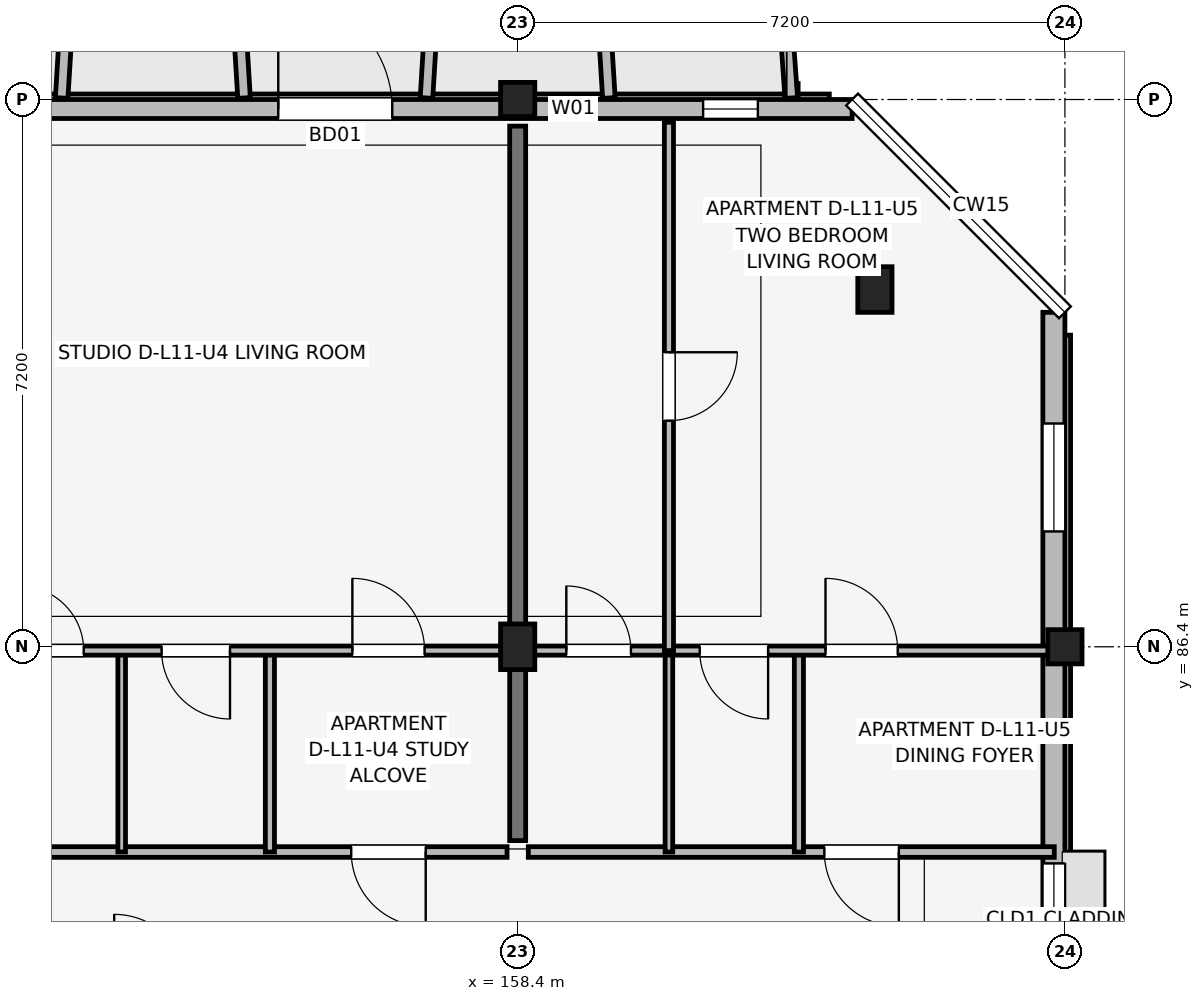
"""IFC4 building model, lengths in metres.
Left out: names, types, materials, properties, quantities, classifications, styles, units other than length and angle.
Written with IfcOpenShell. Run it as: python <this file> out.ifc"""

import sys

from ifc_helpers import new_model, si_unit, direction, frame, frame_2d, origin, origin_2d, place, context, subcontext, project, spatial, rectangle, extrude, element, fill, save


model = new_model("IFC4")
c1 = context("Model", 3, precision=1e-05, world=origin(), true_north=direction((0.0, 1.0)))
c2 = subcontext(c1, "Body", "Model", "MODEL_VIEW")
j1 = project(units=[si_unit("LENGTHUNIT", "METRE"), si_unit("PLANEANGLEUNIT", "RADIAN")], contexts=[c1])
p1 = place(None, origin())
s1 = spatial("IfcSite", under=j1, at=p1, CompositionType="ELEMENT")
p2 = place(p1, origin())
s2 = spatial("IfcBuilding", under=s1, at=p2, CompositionType="ELEMENT")
p3 = place(p2, frame((0.0, 0.0, 37.05)))
s3 = spatial("IfcBuildingStorey", under=s2, at=p3, CompositionType="ELEMENT", Elevation=37.05)
p4 = place(p3, frame((158.4, 86.4, 0.0), z_axis=(0.0, 0.0, 1.0), x_axis=(1.0, 0.0, 0.0)))
e1 = element("IfcColumn", 1, at=p4, inside=s3, PredefinedType="COLUMN", context=c2, shape_type="SweptSolid", body=[
    extrude(rectangle(XDim=0.45, YDim=0.6, at=origin_2d()), origin(), (0.0, 0.0, 1.0), 3.15),
])
for number, where, z_axis, x_axis in (
    (2, (158.4, 93.6, 0.0), (0.0, 0.0, 1.0), (1.0, 0.0, 0.0)),
    (3, (165.6, 86.4, 0.0), (0.0, 0.0, 1.0), (1.0, 0.0, 0.0)),
):
    element("IfcColumn", number, at=place(p3, frame(where, z_axis=z_axis, x_axis=x_axis)), inside=s3, PredefinedType="COLUMN", context=c2, shape_type="SweptSolid", body=[
        extrude(rectangle(XDim=0.45, YDim=0.45, at=origin_2d()), origin(), (0.0, 0.0, 1.0), 3.15),
    ])
p5 = place(p3, frame((163.1, 91.1, 0.0), z_axis=(0.0, 0.0, 1.0), x_axis=(1.0, 0.0, 0.0)))
e4 = element("IfcColumn", 4, at=p5, inside=s3, PredefinedType="COLUMN", context=c2, shape_type="SweptSolid", body=[
    extrude(rectangle(XDim=0.45, YDim=0.6, at=origin_2d()), origin(), (0.0, 0.0, 1.0), 3.15),
])
p6 = place(p3, frame((158.4, 83.85, 0.0), z_axis=(0.0, 0.0, 1.0), x_axis=(0.0, 1.0, 0.0)))
e5 = element("IfcWall", 5, at=p6, inside=s3, PredefinedType="SHEAR", context=c2, shape_type="SweptSolid", body=[
    extrude(rectangle(XDim=9.4, YDim=0.21, at=frame_2d((4.7, 0.0))), origin(), (0.0, 0.0, 1.0), 3.15),
])
p7 = place(p3, frame((165.455, 74.8, 0.0), z_axis=(0.0, 0.0, 1.0), x_axis=(0.0, 1.0, 0.0)))
e6 = element("IfcWall", 6, at=p7, inside=s3, PredefinedType="SOLIDWALL", context=c2, shape_type="SweptSolid", body=[
    extrude(rectangle(XDim=16.0, YDim=0.29, at=frame_2d((8.0, 0.0))), origin(), (0.0, 0.0, 1.0), 2.48),
])
p8 = place(p7, frame((7.25, 0.0, 1.05)))
e7 = element("IfcOpeningElement", 7, at=p8, cuts=e6, PredefinedType="OPENING", context=c2, shape_type="SweptSolid", body=[
    extrude(rectangle(XDim=1.5, YDim=1.15, at=frame_2d((0.75, 0.575))), frame((0.0, 0.155, 0.0), z_axis=(0.0, -1.0, 0.0), x_axis=(1.0, 0.0, 0.0)), (0.0, 0.0, 1.0), 0.31),
])
p9 = place(p7, frame((13.117, 0.0, 0.75)))
e8 = element("IfcOpeningElement", 8, at=p9, cuts=e6, PredefinedType="OPENING", context=c2, shape_type="SweptSolid", body=[
    extrude(rectangle(XDim=1.42, YDim=1.6, at=frame_2d((0.71, 0.8))), frame((0.0, 0.155, 0.0), z_axis=(0.0, -1.0, 0.0), x_axis=(1.0, 0.0, 0.0)), (0.0, 0.0, 1.0), 0.31),
])
p10 = place(p3, frame((162.8, 93.475, 0.0), z_axis=(0.0, 0.0, 1.0), x_axis=(-1.0, 0.0, 0.0)))
e9 = element("IfcWall", 9, at=p10, inside=s3, PredefinedType="SOLIDWALL", context=c2, shape_type="SweptSolid", body=[
    extrude(rectangle(XDim=30.4, YDim=0.25, at=frame_2d((15.2, 0.0))), origin(), (0.0, 0.0, 1.0), 2.45),
])
p11 = place(p10, frame((22.025, 0.0, 0.0), z_axis=(0.0, 0.0, 1.0), x_axis=(-1.0, 0.0, 0.0)))
e10 = element("IfcOpeningElement", 10, at=p11, cuts=e9, PredefinedType="OPENING", context=c2, shape_type="SweptSolid", body=[
    extrude(rectangle(XDim=1.65, YDim=2.15, at=frame_2d((0.825, 1.075))), frame((0.0, 0.135, 0.0), z_axis=(0.0, -1.0, 0.0), x_axis=(1.0, 0.0, 0.0)), (0.0, 0.0, 1.0), 0.27),
])
p12 = place(p10, frame((7.55, 0.0, 0.0), z_axis=(0.0, 0.0, 1.0), x_axis=(-1.0, 0.0, 0.0)))
e11 = element("IfcOpeningElement", 11, at=p12, cuts=e9, PredefinedType="OPENING", context=c2, shape_type="SweptSolid", body=[
    extrude(rectangle(XDim=1.5, YDim=2.15, at=frame_2d((0.75, 1.075))), frame((0.0, 0.135, 0.0), z_axis=(0.0, -1.0, 0.0), x_axis=(1.0, 0.0, 0.0)), (0.0, 0.0, 1.0), 0.27),
])
p13 = place(p10, frame((27.325, 0.0, 0.69)))
e12 = element("IfcOpeningElement", 12, at=p13, cuts=e9, PredefinedType="OPENING", context=c2, shape_type="SweptSolid", body=[
    extrude(rectangle(XDim=2.15, YDim=1.65, at=frame_2d((1.075, 0.825))), frame((0.0, 0.135, 0.0), z_axis=(0.0, -1.0, 0.0), x_axis=(1.0, 0.0, 0.0)), (0.0, 0.0, 1.0), 0.27),
])
p14 = place(p10, frame((23.925, 0.0, 0.75)))
e13 = element("IfcOpeningElement", 13, at=p14, cuts=e9, PredefinedType="OPENING", context=c2, shape_type="SweptSolid", body=[
    extrude(rectangle(XDim=0.72, YDim=1.35, at=frame_2d((0.36, 0.675))), frame((0.0, 0.135, 0.0), z_axis=(0.0, -1.0, 0.0), x_axis=(1.0, 0.0, 0.0)), (0.0, 0.0, 1.0), 0.27),
])
p15 = place(p10, frame((15.54, 0.0, 0.7)))
e14 = element("IfcOpeningElement", 14, at=p15, cuts=e9, PredefinedType="OPENING", context=c2, shape_type="SweptSolid", body=[
    extrude(rectangle(XDim=1.72, YDim=1.6, at=frame_2d((0.86, 0.8))), frame((0.0, 0.135, 0.0), z_axis=(0.0, -1.0, 0.0), x_axis=(1.0, 0.0, 0.0)), (0.0, 0.0, 1.0), 0.27),
])
p16 = place(p10, frame((3.367, 0.0, 0.75)))
e15 = element("IfcOpeningElement", 15, at=p16, cuts=e9, PredefinedType="OPENING", context=c2, shape_type="SweptSolid", body=[
    extrude(rectangle(XDim=0.6, YDim=1.25, at=frame_2d((0.3, 0.625))), frame((0.0, 0.135, 0.0), z_axis=(0.0, -1.0, 0.0), x_axis=(1.0, 0.0, 0.0)), (0.0, 0.0, 1.0), 0.27),
])
p17 = place(p10, frame((1.24, 0.0, 0.75)))
e16 = element("IfcOpeningElement", 16, at=p17, cuts=e9, PredefinedType="OPENING", context=c2, shape_type="SweptSolid", body=[
    extrude(rectangle(XDim=0.72, YDim=1.35, at=frame_2d((0.36, 0.675))), frame((0.0, 0.135, 0.0), z_axis=(0.0, -1.0, 0.0), x_axis=(1.0, 0.0, 0.0)), (0.0, 0.0, 1.0), 0.27),
])
for number, where, z_axis, x_axis in (
    (17, (152.4, 93.62, 0.0), (0.0, 0.0, 1.0), (0.061, 0.998, 0.0)),
    (18, (154.8, 93.62, 0.0), (0.0, 0.0, 1.0), (-0.061, 0.998, 0.0)),
    (19, (157.2, 93.62, 0.0), (0.0, 0.0, 1.0), (0.061, 0.998, 0.0)),
):
    element("IfcWall", number, at=place(p3, frame(where, z_axis=z_axis, x_axis=x_axis)), inside=s3, PredefinedType="ELEMENTEDWALL", context=c2, shape_type="SweptSolid", body=[
        extrude(rectangle(XDim=1.964, YDim=0.165, at=frame_2d((0.982, 0.0))), origin(), (0.0, 0.0, 1.0), 2.53),
    ])
p18 = place(p3, frame((159.6, 93.62, 0.0), z_axis=(0.0, 0.0, 1.0), x_axis=(-0.061170732449, 0.998127317276, 0.0)))
e20 = element("IfcWall", 20, at=p18, inside=s3, PredefinedType="ELEMENTEDWALL", context=c2, shape_type="SweptSolid", body=[
    extrude(rectangle(XDim=1.964, YDim=0.165, at=frame_2d((0.982, 0.0))), origin(), (0.0, 0.0, 1.0), 2.95),
])
p19 = place(p3, frame((162.0, 93.62, 0.0), z_axis=(0.0, 0.0, 1.0), x_axis=(-0.071194071069, 0.997462482625, 0.0)))
e21 = element("IfcWall", 21, at=p19, inside=s3, PredefinedType="ELEMENTEDWALL", context=c2, shape_type="SweptSolid", body=[
    extrude(rectangle(XDim=1.965, YDim=0.165, at=frame_2d((0.982, 0.0))), origin(), (0.0, 0.0, 1.0), 2.95),
])
p20 = place(p3, frame((151.34, 83.7, 0.0), z_axis=(0.0, 0.0, 1.0), x_axis=(1.0, 0.0, 0.0)))
e22 = element("IfcWall", 22, at=p20, inside=s3, PredefinedType="PARTITIONING", context=c2, shape_type="SweptSolid", body=[
    extrude(rectangle(XDim=6.92, YDim=0.14, at=frame_2d((3.46, 0.0))), origin(), (0.0, 0.0, 1.0), 2.38),
])
p21 = place(p20, frame((5.85, 0.0, 0.0), z_axis=(0.0, 0.0, 1.0), x_axis=(-1.0, 0.0, 0.0)))
e23 = element("IfcOpeningElement", 23, at=p21, cuts=e22, PredefinedType="OPENING", context=c2, shape_type="SweptSolid", body=[
    extrude(rectangle(XDim=0.98, YDim=2.1, at=frame_2d((0.49, 1.05))), frame((0.0, 0.08, 0.0), z_axis=(0.0, -1.0, 0.0), x_axis=(1.0, 0.0, 0.0)), (0.0, 0.0, 1.0), 0.16),
])
p22 = place(p3, frame((153.19, 83.7, 0.0), z_axis=(0.0, 0.0, 1.0), x_axis=(0.0, 1.0, 0.0)))
e24 = element("IfcWall", 24, at=p22, inside=s3, PredefinedType="PARTITIONING", context=c2, shape_type="SweptSolid", body=[
    extrude(rectangle(XDim=2.65, YDim=0.1, at=frame_2d((1.325, 0.0))), origin(), (0.0, 0.0, 1.0), 2.38),
])
p23 = place(p3, frame((155.14, 83.7, 0.0), z_axis=(0.0, 0.0, 1.0), x_axis=(0.0, 1.0, 0.0)))
e25 = element("IfcWall", 25, at=p23, inside=s3, PredefinedType="PARTITIONING", context=c2, shape_type="SweptSolid", body=[
    extrude(rectangle(XDim=2.65, YDim=0.12, at=frame_2d((1.325, 0.0))), origin(), (0.0, 0.0, 1.0), 2.38),
])
p24 = place(p3, frame((151.34, 86.35, 0.0), z_axis=(0.0, 0.0, 1.0), x_axis=(1.0, 0.0, 0.0)))
e26 = element("IfcWall", 26, at=p24, inside=s3, PredefinedType="PARTITIONING", context=c2, shape_type="SweptSolid", body=[
    extrude(rectangle(XDim=6.92, YDim=0.12, at=frame_2d((3.46, 0.0))), origin(), (0.0, 0.0, 1.0), 2.38),
])
p25 = place(p24, frame((0.5, 0.0, 0.0)))
e27 = element("IfcOpeningElement", 27, at=p25, cuts=e26, PredefinedType="OPENING", context=c2, shape_type="SweptSolid", body=[
    extrude(rectangle(XDim=0.85, YDim=2.08, at=frame_2d((0.425, 1.04))), frame((0.0, 0.07, 0.0), z_axis=(0.0, -1.0, 0.0), x_axis=(1.0, 0.0, 0.0)), (0.0, 0.0, 1.0), 0.14),
])
p26 = place(p24, frame((3.275, 0.0, 0.0), z_axis=(0.0, 0.0, 1.0), x_axis=(-1.0, 0.0, 0.0)))
e28 = element("IfcOpeningElement", 28, at=p26, cuts=e26, PredefinedType="OPENING", context=c2, shape_type="SweptSolid", body=[
    extrude(rectangle(XDim=0.9, YDim=2.08, at=frame_2d((0.45, 1.04))), frame((0.0, 0.07, 0.0), z_axis=(0.0, -1.0, 0.0), x_axis=(1.0, 0.0, 0.0)), (0.0, 0.0, 1.0), 0.14),
])
p27 = place(p24, frame((4.885, 0.0, 0.0)))
e29 = element("IfcOpeningElement", 29, at=p27, cuts=e26, PredefinedType="OPENING", context=c2, shape_type="SweptSolid", body=[
    extrude(rectangle(XDim=0.95, YDim=2.08, at=frame_2d((0.475, 1.04))), frame((0.0, 0.07, 0.0), z_axis=(0.0, -1.0, 0.0), x_axis=(1.0, 0.0, 0.0)), (0.0, 0.0, 1.0), 0.14),
])
p28 = place(p3, frame((158.54, 83.7, 0.0), z_axis=(0.0, 0.0, 1.0), x_axis=(1.0, 0.0, 0.0)))
e30 = element("IfcWall", 30, at=p28, inside=s3, PredefinedType="PARTITIONING", context=c2, shape_type="SweptSolid", body=[
    extrude(rectangle(XDim=6.92, YDim=0.14, at=frame_2d((3.46, 0.0))), origin(), (0.0, 0.0, 1.0), 2.38),
])
p29 = place(p28, frame((4.875, 0.0, 0.0), z_axis=(0.0, 0.0, 1.0), x_axis=(-1.0, 0.0, 0.0)))
e31 = element("IfcOpeningElement", 31, at=p29, cuts=e30, PredefinedType="OPENING", context=c2, shape_type="SweptSolid", body=[
    extrude(rectangle(XDim=0.98, YDim=2.1, at=frame_2d((0.49, 1.05))), frame((0.0, 0.08, 0.0), z_axis=(0.0, -1.0, 0.0), x_axis=(1.0, 0.0, 0.0)), (0.0, 0.0, 1.0), 0.16),
])
p30 = place(p3, frame((160.39, 83.7, 0.0), z_axis=(0.0, 0.0, 1.0), x_axis=(0.0, 1.0, 0.0)))
e32 = element("IfcWall", 32, at=p30, inside=s3, PredefinedType="PARTITIONING", context=c2, shape_type="SweptSolid", body=[
    extrude(rectangle(XDim=2.65, YDim=0.1, at=frame_2d((1.325, 0.0))), origin(), (0.0, 0.0, 1.0), 2.38),
])
p31 = place(p3, frame((162.1, 83.7, 0.0), z_axis=(0.0, 0.0, 1.0), x_axis=(0.0, 1.0, 0.0)))
e33 = element("IfcWall", 33, at=p31, inside=s3, PredefinedType="PARTITIONING", context=c2, shape_type="SweptSolid", body=[
    extrude(rectangle(XDim=2.65, YDim=0.12, at=frame_2d((1.325, 0.0))), origin(), (0.0, 0.0, 1.0), 2.38),
])
p32 = place(p3, frame((158.54, 86.35, 0.0), z_axis=(0.0, 0.0, 1.0), x_axis=(1.0, 0.0, 0.0)))
e34 = element("IfcWall", 34, at=p32, inside=s3, PredefinedType="PARTITIONING", context=c2, shape_type="SweptSolid", body=[
    extrude(rectangle(XDim=6.92, YDim=0.12, at=frame_2d((3.46, 0.0))), origin(), (0.0, 0.0, 1.0), 2.38),
])
p33 = place(p32, frame((0.5, 0.0, 0.0)))
e35 = element("IfcOpeningElement", 35, at=p33, cuts=e34, PredefinedType="OPENING", context=c2, shape_type="SweptSolid", body=[
    extrude(rectangle(XDim=0.85, YDim=2.08, at=frame_2d((0.425, 1.04))), frame((0.0, 0.07, 0.0), z_axis=(0.0, -1.0, 0.0), x_axis=(1.0, 0.0, 0.0)), (0.0, 0.0, 1.0), 0.14),
])
p34 = place(p32, frame((3.155, 0.0, 0.0), z_axis=(0.0, 0.0, 1.0), x_axis=(-1.0, 0.0, 0.0)))
e36 = element("IfcOpeningElement", 36, at=p34, cuts=e34, PredefinedType="OPENING", context=c2, shape_type="SweptSolid", body=[
    extrude(rectangle(XDim=0.9, YDim=2.08, at=frame_2d((0.45, 1.04))), frame((0.0, 0.07, 0.0), z_axis=(0.0, -1.0, 0.0), x_axis=(1.0, 0.0, 0.0)), (0.0, 0.0, 1.0), 0.14),
])
p35 = place(p32, frame((3.91, 0.0, 0.0)))
e37 = element("IfcOpeningElement", 37, at=p35, cuts=e34, PredefinedType="OPENING", context=c2, shape_type="SweptSolid", body=[
    extrude(rectangle(XDim=0.95, YDim=2.08, at=frame_2d((0.475, 1.04))), frame((0.0, 0.07, 0.0), z_axis=(0.0, -1.0, 0.0), x_axis=(1.0, 0.0, 0.0)), (0.0, 0.0, 1.0), 0.14),
])
p36 = place(p3, frame((160.39, 86.35, 0.0), z_axis=(0.0, 0.0, 1.0), x_axis=(0.0, 1.0, 0.0)))
e38 = element("IfcWall", 38, at=p36, inside=s3, PredefinedType="PARTITIONING", context=c2, shape_type="SweptSolid", body=[
    extrude(rectangle(XDim=6.95, YDim=0.12, at=frame_2d((3.475, 0.0))), origin(), (0.0, 0.0, 1.0), 2.38),
])
p37 = place(p36, frame((3.925, 0.0, 0.0), z_axis=(0.0, 0.0, 1.0), x_axis=(-1.0, 0.0, 0.0)))
e39 = element("IfcOpeningElement", 39, at=p37, cuts=e38, PredefinedType="OPENING", context=c2, shape_type="SweptSolid", body=[
    extrude(rectangle(XDim=0.9, YDim=2.08, at=frame_2d((0.45, 1.04))), frame((0.0, 0.07, 0.0), z_axis=(0.0, -1.0, 0.0), x_axis=(1.0, 0.0, 0.0)), (0.0, 0.0, 1.0), 0.14),
])
p38 = place(p12, origin())
e40 = element("IfcDoor", 40, at=p38, inside=s3, OperationType="SINGLE_SWING_RIGHT", PredefinedType="DOOR", context=c2, shape_type="SweptSolid", body=[
    extrude(rectangle(XDim=1.5, YDim=2.15, at=frame_2d((0.75, 1.075))), frame((0.0, 0.025, 0.0), z_axis=(0.0, -1.0, 0.0), x_axis=(1.0, 0.0, 0.0)), (0.0, 0.0, 1.0), 0.05),
])
fill(e11, e40)
p39 = place(p16, origin())
e41 = element("IfcWindow", 41, at=p39, inside=s3, PartitioningType="SINGLE_PANEL", PredefinedType="WINDOW", context=c2, shape_type="SweptSolid", body=[
    extrude(rectangle(XDim=0.6, YDim=1.25, at=frame_2d((0.3, 0.625))), frame((0.0, 0.03, 0.0), z_axis=(0.0, -1.0, 0.0), x_axis=(1.0, 0.0, 0.0)), (0.0, 0.0, 1.0), 0.06),
])
fill(e15, e41)
p40 = place(p17, origin())
e42 = element("IfcWindow", 42, at=p40, inside=s3, PartitioningType="SINGLE_PANEL", PredefinedType="WINDOW", context=c2, shape_type="SweptSolid", body=[
    extrude(rectangle(XDim=0.72, YDim=1.35, at=frame_2d((0.36, 0.675))), frame((0.0, 0.03, 0.0), z_axis=(0.0, -1.0, 0.0), x_axis=(1.0, 0.0, 0.0)), (0.0, 0.0, 1.0), 0.06),
])
fill(e16, e42)
p41 = place(p8, origin())
e43 = element("IfcWindow", 43, at=p41, inside=s3, PartitioningType="SINGLE_PANEL", PredefinedType="WINDOW", context=c2, shape_type="SweptSolid", body=[
    extrude(rectangle(XDim=1.5, YDim=1.15, at=frame_2d((0.75, 0.575))), frame((0.0, 0.03, 0.0), z_axis=(0.0, -1.0, 0.0), x_axis=(1.0, 0.0, 0.0)), (0.0, 0.0, 1.0), 0.06),
])
fill(e7, e43)
p42 = place(p9, origin())
e44 = element("IfcWindow", 44, at=p42, inside=s3, PartitioningType="SINGLE_PANEL", PredefinedType="WINDOW", context=c2, shape_type="SweptSolid", body=[
    extrude(rectangle(XDim=1.42, YDim=1.6, at=frame_2d((0.71, 0.8))), frame((0.0, 0.03, 0.0), z_axis=(0.0, -1.0, 0.0), x_axis=(1.0, 0.0, 0.0)), (0.0, 0.0, 1.0), 0.06),
])
fill(e8, e44)
p43 = place(p21, origin())
e45 = element("IfcDoor", 45, at=p43, inside=s3, OperationType="SINGLE_SWING_RIGHT", PredefinedType="DOOR", context=c2, shape_type="SweptSolid", body=[
    extrude(rectangle(XDim=0.98, YDim=2.1, at=frame_2d((0.49, 1.05))), frame((0.0, 0.025, 0.0), z_axis=(0.0, -1.0, 0.0), x_axis=(1.0, 0.0, 0.0)), (0.0, 0.0, 1.0), 0.05),
])
fill(e23, e45)
p44 = place(p25, origin())
e46 = element("IfcDoor", 46, at=p44, inside=s3, OperationType="SINGLE_SWING_LEFT", PredefinedType="DOOR", context=c2, shape_type="SweptSolid", body=[
    extrude(rectangle(XDim=0.85, YDim=2.08, at=frame_2d((0.425, 1.04))), frame((0.0, 0.025, 0.0), z_axis=(0.0, -1.0, 0.0), x_axis=(1.0, 0.0, 0.0)), (0.0, 0.0, 1.0), 0.05),
])
fill(e27, e46)
p45 = place(p26, origin())
e47 = element("IfcDoor", 47, at=p45, inside=s3, OperationType="SINGLE_SWING_RIGHT", PredefinedType="DOOR", context=c2, shape_type="SweptSolid", body=[
    extrude(rectangle(XDim=0.9, YDim=2.08, at=frame_2d((0.45, 1.04))), frame((0.0, 0.025, 0.0), z_axis=(0.0, -1.0, 0.0), x_axis=(1.0, 0.0, 0.0)), (0.0, 0.0, 1.0), 0.05),
])
fill(e28, e47)
p46 = place(p27, origin())
e48 = element("IfcDoor", 48, at=p46, inside=s3, OperationType="SINGLE_SWING_LEFT", PredefinedType="DOOR", context=c2, shape_type="SweptSolid", body=[
    extrude(rectangle(XDim=0.95, YDim=2.08, at=frame_2d((0.475, 1.04))), frame((0.0, 0.025, 0.0), z_axis=(0.0, -1.0, 0.0), x_axis=(1.0, 0.0, 0.0)), (0.0, 0.0, 1.0), 0.05),
])
fill(e29, e48)
p47 = place(p29, origin())
e49 = element("IfcDoor", 49, at=p47, inside=s3, OperationType="SINGLE_SWING_RIGHT", PredefinedType="DOOR", context=c2, shape_type="SweptSolid", body=[
    extrude(rectangle(XDim=0.98, YDim=2.1, at=frame_2d((0.49, 1.05))), frame((0.0, 0.025, 0.0), z_axis=(0.0, -1.0, 0.0), x_axis=(1.0, 0.0, 0.0)), (0.0, 0.0, 1.0), 0.05),
])
fill(e31, e49)
p48 = place(p33, origin())
e50 = element("IfcDoor", 50, at=p48, inside=s3, OperationType="SINGLE_SWING_LEFT", PredefinedType="DOOR", context=c2, shape_type="SweptSolid", body=[
    extrude(rectangle(XDim=0.85, YDim=2.08, at=frame_2d((0.425, 1.04))), frame((0.0, 0.025, 0.0), z_axis=(0.0, -1.0, 0.0), x_axis=(1.0, 0.0, 0.0)), (0.0, 0.0, 1.0), 0.05),
])
fill(e35, e50)
p49 = place(p34, origin())
e51 = element("IfcDoor", 51, at=p49, inside=s3, OperationType="SINGLE_SWING_RIGHT", PredefinedType="DOOR", context=c2, shape_type="SweptSolid", body=[
    extrude(rectangle(XDim=0.9, YDim=2.08, at=frame_2d((0.45, 1.04))), frame((0.0, 0.025, 0.0), z_axis=(0.0, -1.0, 0.0), x_axis=(1.0, 0.0, 0.0)), (0.0, 0.0, 1.0), 0.05),
])
fill(e36, e51)
p50 = place(p35, origin())
e52 = element("IfcDoor", 52, at=p50, inside=s3, OperationType="SINGLE_SWING_LEFT", PredefinedType="DOOR", context=c2, shape_type="SweptSolid", body=[
    extrude(rectangle(XDim=0.95, YDim=2.08, at=frame_2d((0.475, 1.04))), frame((0.0, 0.025, 0.0), z_axis=(0.0, -1.0, 0.0), x_axis=(1.0, 0.0, 0.0)), (0.0, 0.0, 1.0), 0.05),
])
fill(e37, e52)
p51 = place(p37, origin())
e53 = element("IfcDoor", 53, at=p51, inside=s3, OperationType="SINGLE_SWING_RIGHT", PredefinedType="DOOR", context=c2, shape_type="SweptSolid", body=[
    extrude(rectangle(XDim=0.9, YDim=2.08, at=frame_2d((0.45, 1.04))), frame((0.0, 0.025, 0.0), z_axis=(0.0, -1.0, 0.0), x_axis=(1.0, 0.0, 0.0)), (0.0, 0.0, 1.0), 0.05),
])
fill(e39, e53)
save(model, sys.argv[1])
